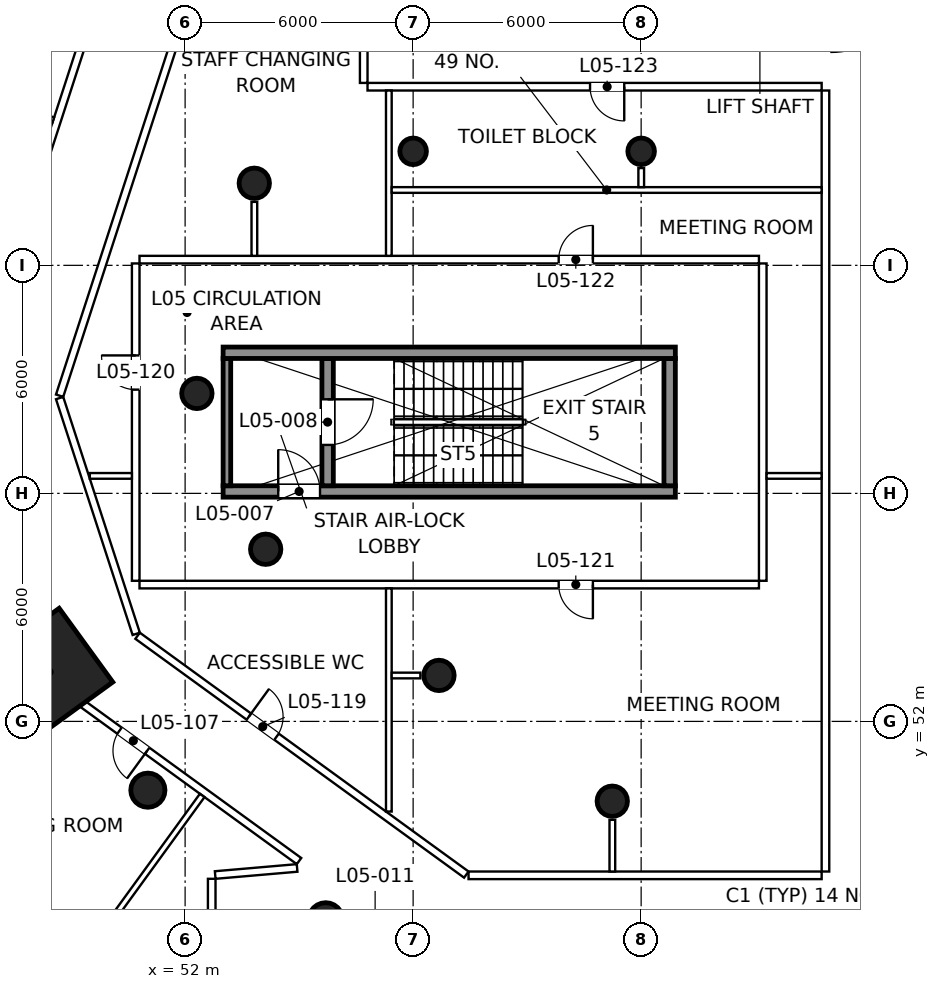
"""IFC4 building model, lengths in metres.
Left out: names, types, materials, properties, quantities, classifications, styles, units other than length and angle.
Written with IfcOpenShell. Run it as: python <this file> out.ifc"""

import sys

from ifc_helpers import new_model, si_unit, direction, frame, frame_2d, origin, origin_2d, place, context, subcontext, project, spatial, rectangle, circle, extrude, element, fill, save


model = new_model("IFC4")
c1 = context("Model", 3, precision=1e-05, world=origin(), true_north=direction((0.0, 1.0)))
c2 = subcontext(c1, "Body", "Model", "MODEL_VIEW")
j1 = project(units=[si_unit("LENGTHUNIT", "METRE"), si_unit("PLANEANGLEUNIT", "RADIAN")], contexts=[c1])
p1 = place(None, origin())
s1 = spatial("IfcSite", under=j1, at=p1, CompositionType="ELEMENT")
p2 = place(p1, origin())
s2 = spatial("IfcBuilding", under=s1, at=p2, CompositionType="ELEMENT")
p3 = place(p2, frame((0.0, 0.0, 34.0)))
s3 = spatial("IfcBuildingStorey", under=s2, at=p3, CompositionType="ELEMENT", Elevation=34.0)
p4 = place(p3, frame((48.42, 53.3, 0.0), z_axis=(0.0, 0.0, 1.0), x_axis=(-0.809016994375, -0.587785252292, 0.0)))
e1 = element("IfcColumn", 1, at=p4, inside=s3, PredefinedType="COLUMN", context=c2, shape_type="SweptSolid", body=[
    extrude(rectangle(XDim=2.4, YDim=2.4, at=origin_2d()), origin(), (0.0, 0.0, 1.0), 5.0),
])
for number, where, z_axis, x_axis in (
    (2, (51.02, 50.19, 0.0), (0.0, 0.0, 1.0), (1.0, 0.0, 0.0)),
    (3, (55.7, 46.78, 0.0), (0.0, 0.0, 1.0), (1.0, 0.0, 0.0)),
):
    element("IfcColumn", number, at=place(p3, frame(where, z_axis=z_axis, x_axis=x_axis)), inside=s3, PredefinedType="COLUMN", context=c2, shape_type="SweptSolid", body=[
        extrude(circle(Radius=0.45, at=origin_2d()), origin(), (0.0, 0.0, 1.0), 5.0),
    ])
for number, where, z_axis, x_axis in (
    (4, (52.31, 60.63, 0.0), (0.0, 0.0, 1.0), (1.0, 0.0, 0.0)),
    (5, (54.12, 56.53, 0.0), (0.0, 0.0, 1.0), (1.0, 0.0, 0.0)),
    (6, (58.68, 53.21, 0.0), (0.0, 0.0, 1.0), (1.0, 0.0, 0.0)),
    (7, (63.24, 49.9, 0.0), (0.0, 0.0, 1.0), (1.0, 0.0, 0.0)),
    (8, (53.82, 66.16, 0.0), (0.0, 0.0, 1.0), (1.0, 0.0, 0.0)),
):
    element("IfcColumn", number, at=place(p3, frame(where, z_axis=z_axis, x_axis=x_axis)), inside=s3, PredefinedType="COLUMN", context=c2, shape_type="SweptSolid", body=[
        extrude(circle(Radius=0.4, at=origin_2d()), origin(), (0.0, 0.0, 1.0), 5.0),
    ])
for number, where, z_axis, x_axis in (
    (9, (58.0, 67.0, 0.0), (0.0, 0.0, 1.0), (1.0, 0.0, 0.0)),
    (10, (64.0, 67.0, 0.0), (0.0, 0.0, 1.0), (1.0, 0.0, 0.0)),
):
    element("IfcColumn", number, at=place(p3, frame(where, z_axis=z_axis, x_axis=x_axis)), inside=s3, PredefinedType="COLUMN", context=c2, shape_type="SweptSolid", body=[
        extrude(circle(Radius=0.35, at=origin_2d()), origin(), (0.0, 0.0, 1.0), 5.0),
    ])
p5 = place(p3, frame((43.634, 48.126, 0.0), z_axis=(0.0, 0.0, 1.0), x_axis=(0.808999938455, -0.587808727036, 0.0)))
e11 = element("IfcWall", 11, at=p5, inside=s3, PredefinedType="SOLIDWALL", context=c2, shape_type="SweptSolid", body=[
    extrude(rectangle(XDim=9.0, YDim=0.32, at=frame_2d((4.5, 0.0))), origin(), (0.0, 0.0, 1.0), 0.9),
])
p6 = place(p3, frame((53.0, 58.05, 0.0), z_axis=(0.0, 0.0, 1.0), x_axis=(1.0, 0.0, 0.0)))
e12 = element("IfcWall", 12, at=p6, inside=s3, PredefinedType="SHEAR", context=c2, shape_type="SweptSolid", body=[
    extrude(rectangle(XDim=11.9, YDim=0.3, at=frame_2d((5.95, 0.0))), origin(), (0.0, 0.0, 1.0), 5.0),
])
p7 = place(p6, frame((1.45, 0.0, 0.0)))
e13 = element("IfcOpeningElement", 13, at=p7, cuts=e12, PredefinedType="OPENING", context=c2, shape_type="SweptSolid", body=[
    extrude(rectangle(XDim=1.1, YDim=2.1, at=frame_2d((0.55, 1.05))), frame((0.0, 0.16, 0.0), z_axis=(0.0, -1.0, 0.0), x_axis=(1.0, 0.0, 0.0)), (0.0, 0.0, 1.0), 0.32),
])
p8 = place(p3, frame((53.1, 58.2, 0.0), z_axis=(0.0, 0.0, 1.0), x_axis=(0.0, 1.0, 0.0)))
e14 = element("IfcWall", 14, at=p8, inside=s3, PredefinedType="SHEAR", context=c2, shape_type="SweptSolid", body=[
    extrude(rectangle(XDim=3.35, YDim=0.2, at=frame_2d((1.675, 0.0))), origin(), (0.0, 0.0, 1.0), 5.0),
])
p9 = place(p3, frame((55.75, 58.2, 0.0), z_axis=(0.0, 0.0, 1.0), x_axis=(0.0, 1.0, 0.0)))
e15 = element("IfcWall", 15, at=p9, inside=s3, PredefinedType="SHEAR", context=c2, shape_type="SweptSolid", body=[
    extrude(rectangle(XDim=3.35, YDim=0.3, at=frame_2d((1.675, 0.0))), origin(), (0.0, 0.0, 1.0), 5.0),
])
p10 = place(p9, frame((1.075, 0.0, 0.0)))
e16 = element("IfcOpeningElement", 16, at=p10, cuts=e15, PredefinedType="OPENING", context=c2, shape_type="SweptSolid", body=[
    extrude(rectangle(XDim=1.2, YDim=2.1, at=frame_2d((0.6, 1.05))), frame((0.0, 0.16, 0.0), z_axis=(0.0, -1.0, 0.0), x_axis=(1.0, 0.0, 0.0)), (0.0, 0.0, 1.0), 0.32),
])
p11 = place(p3, frame((64.75, 58.2, 0.0), z_axis=(0.0, 0.0, 1.0), x_axis=(0.0, 1.0, 0.0)))
e17 = element("IfcWall", 17, at=p11, inside=s3, PredefinedType="SHEAR", context=c2, shape_type="SweptSolid", body=[
    extrude(rectangle(XDim=3.35, YDim=0.3, at=frame_2d((1.675, 0.0))), origin(), (0.0, 0.0, 1.0), 5.0),
])
p12 = place(p3, frame((53.0, 61.7, 0.0), z_axis=(0.0, 0.0, 1.0), x_axis=(1.0, 0.0, 0.0)))
e18 = element("IfcWall", 18, at=p12, inside=s3, PredefinedType="SHEAR", context=c2, shape_type="SweptSolid", body=[
    extrude(rectangle(XDim=11.9, YDim=0.3, at=frame_2d((5.95, 0.0))), origin(), (0.0, 0.0, 1.0), 5.0),
])
p13 = place(p3, frame((52.7, 41.737, 0.0), z_axis=(0.0, 0.0, 1.0), x_axis=(0.0, 1.0, 0.0)))
e19 = element("IfcWall", 19, at=p13, inside=s3, PredefinedType="PARTITIONING", context=c2, shape_type="SweptSolid", body=[
    extrude(rectangle(XDim=6.122, YDim=0.2, at=frame_2d((3.061, 0.0))), origin(), (0.0, 0.0, 1.0), 3.9),
])
p14 = place(p13, frame((2.656, 0.0, 0.0)))
e20 = element("IfcOpeningElement", 20, at=p14, cuts=e19, PredefinedType="OPENING", context=c2, shape_type="SweptSolid", body=[
    extrude(rectangle(XDim=0.9, YDim=2.1, at=frame_2d((0.45, 1.05))), frame((0.0, 0.11, 0.0), z_axis=(0.0, -1.0, 0.0), x_axis=(1.0, 0.0, 0.0)), (0.0, 0.0, 1.0), 0.22),
])
p15 = place(p3, frame((52.792, 47.958, 0.0), z_axis=(0.0, 0.0, 1.0), x_axis=(0.996286600035, 0.086098841978, 0.0)))
e21 = element("IfcWall", 21, at=p15, inside=s3, PredefinedType="PARTITIONING", context=c2, shape_type="SweptSolid", body=[
    extrude(rectangle(XDim=2.164, YDim=0.2, at=frame_2d((1.082, 0.0))), origin(), (0.0, 0.0, 1.0), 4.1),
])
p16 = place(p3, frame((54.997, 48.325, 0.0), z_axis=(0.0, 0.0, 1.0), x_axis=(-0.809019601086, 0.587781664446, 0.0)))
e22 = element("IfcWall", 22, at=p16, inside=s3, PredefinedType="PARTITIONING", context=c2, shape_type="SweptSolid", body=[
    extrude(rectangle(XDim=7.668, YDim=0.2, at=frame_2d((3.834, 0.0))), origin(), (0.0, 0.0, 1.0), 4.1),
])
p17 = place(p16, frame((4.938, 0.0, 0.0)))
e23 = element("IfcOpeningElement", 23, at=p17, cuts=e22, PredefinedType="OPENING", context=c2, shape_type="SweptSolid", body=[
    extrude(rectangle(XDim=0.9, YDim=2.1, at=frame_2d((0.45, 1.05))), frame((0.0, 0.11, 0.0), z_axis=(0.0, -1.0, 0.0), x_axis=(1.0, 0.0, 0.0)), (0.0, 0.0, 1.0), 0.22),
])
p18 = place(p3, frame((48.757, 52.882, 0.0), z_axis=(0.0, 0.0, 1.0), x_axis=(-0.309030308026, 0.951052190325, 0.0)))
e24 = element("IfcWall", 24, at=p18, inside=s3, PredefinedType="PARTITIONING", context=c2, shape_type="SweptSolid", body=[
    extrude(rectangle(XDim=8.019, YDim=0.2, at=frame_2d((4.009, 0.0))), origin(), (0.0, 0.0, 1.0), 3.9),
])
p19 = place(p18, frame((6.33, 0.0, 0.0)))
e25 = element("IfcOpeningElement", 25, at=p19, cuts=e24, PredefinedType="OPENING", context=c2, shape_type="SweptSolid", body=[
    extrude(rectangle(XDim=0.9, YDim=2.1, at=frame_2d((0.45, 1.05))), frame((0.0, 0.11, 0.0), z_axis=(0.0, -1.0, 0.0), x_axis=(1.0, 0.0, 0.0)), (0.0, 0.0, 1.0), 0.22),
])
p20 = place(p18, frame((2.288, 0.0, 0.0)))
e26 = element("IfcOpeningElement", 26, at=p20, cuts=e24, PredefinedType="OPENING", context=c2, shape_type="SweptSolid", body=[
    extrude(rectangle(XDim=0.9, YDim=2.1, at=frame_2d((0.45, 1.05))), frame((0.0, 0.11, 0.0), z_axis=(0.0, -1.0, 0.0), x_axis=(1.0, 0.0, 0.0)), (0.0, 0.0, 1.0), 0.22),
])
p21 = place(p3, frame((46.279, 60.57, 0.0), z_axis=(0.0, 0.0, 1.0), x_axis=(0.309020575415, 0.951055352737, 0.0)))
e27 = element("IfcWall", 27, at=p21, inside=s3, PredefinedType="PARTITIONING", context=c2, shape_type="SweptSolid", body=[
    extrude(rectangle(XDim=21.409, YDim=0.2, at=frame_2d((10.704, 0.0))), origin(), (0.0, 0.0, 1.0), 3.9),
])
p22 = place(p21, frame((20.005, 0.0, 0.0)))
e28 = element("IfcOpeningElement", 28, at=p22, cuts=e27, PredefinedType="OPENING", context=c2, shape_type="SweptSolid", body=[
    extrude(rectangle(XDim=0.8, YDim=2.1, at=frame_2d((0.4, 1.05))), frame((0.0, 0.11, 0.0), z_axis=(0.0, -1.0, 0.0), x_axis=(1.0, 0.0, 0.0)), (0.0, 0.0, 1.0), 0.22),
])
p23 = place(p21, frame((16.142, 0.0, 0.0)))
e29 = element("IfcOpeningElement", 29, at=p23, cuts=e27, PredefinedType="OPENING", context=c2, shape_type="SweptSolid", body=[
    extrude(rectangle(XDim=0.9, YDim=2.1, at=frame_2d((0.45, 1.05))), frame((0.0, 0.11, 0.0), z_axis=(0.0, -1.0, 0.0), x_axis=(1.0, 0.0, 0.0)), (0.0, 0.0, 1.0), 0.22),
])
p24 = place(p21, frame((10.142, 0.0, 0.0)))
e30 = element("IfcOpeningElement", 30, at=p24, cuts=e27, PredefinedType="OPENING", context=c2, shape_type="SweptSolid", body=[
    extrude(rectangle(XDim=0.9, YDim=2.1, at=frame_2d((0.45, 1.05))), frame((0.0, 0.11, 0.0), z_axis=(0.0, -1.0, 0.0), x_axis=(1.0, 0.0, 0.0)), (0.0, 0.0, 1.0), 0.22),
])
p25 = place(p21, frame((3.33, 0.0, 0.0)))
e31 = element("IfcOpeningElement", 31, at=p25, cuts=e27, PredefinedType="OPENING", context=c2, shape_type="SweptSolid", body=[
    extrude(rectangle(XDim=0.9, YDim=2.1, at=frame_2d((0.45, 1.05))), frame((0.0, 0.11, 0.0), z_axis=(0.0, -1.0, 0.0), x_axis=(1.0, 0.0, 0.0)), (0.0, 0.0, 1.0), 0.22),
])
p26 = place(p3, frame((68.75, 68.7, 0.0), z_axis=(0.0, 0.0, 1.0), x_axis=(-1.0, 0.0, 0.0)))
e32 = element("IfcWall", 32, at=p26, inside=s3, PredefinedType="PARTITIONING", context=c2, shape_type="SweptSolid", body=[
    extrude(rectangle(XDim=11.95, YDim=0.2, at=frame_2d((5.975, 0.0))), origin(), (0.0, 0.0, 1.0), 4.6),
])
p27 = place(p26, frame((5.195, 0.0, 0.0)))
e33 = element("IfcOpeningElement", 33, at=p27, cuts=e32, PredefinedType="OPENING", context=c2, shape_type="SweptSolid", body=[
    extrude(rectangle(XDim=0.9, YDim=2.1, at=frame_2d((0.45, 1.05))), frame((0.0, 0.11, 0.0), z_axis=(0.0, -1.0, 0.0), x_axis=(1.0, 0.0, 0.0)), (0.0, 0.0, 1.0), 0.22),
])
p28 = place(p3, frame((56.7, 68.8, 0.0), z_axis=(0.0, 0.0, 1.0), x_axis=(0.0, 1.0, 0.0)))
e34 = element("IfcWall", 34, at=p28, inside=s3, PredefinedType="PARTITIONING", context=c2, shape_type="SweptSolid", body=[
    extrude(rectangle(XDim=9.8, YDim=0.2, at=frame_2d((4.9, 0.0))), origin(), (0.0, 0.0, 1.0), 4.0),
])
p29 = place(p3, frame((54.566, 78.631, 0.0), z_axis=(0.0, 0.0, 1.0), x_axis=(-0.309021827521, -0.951054945897, 0.0)))
e35 = element("IfcWall", 35, at=p29, inside=s3, PredefinedType="PARTITIONING", context=c2, shape_type="SweptSolid", body=[
    extrude(rectangle(XDim=18.99, YDim=0.2, at=frame_2d((9.495, 0.0))), origin(), (0.0, 0.0, 1.0), 4.6),
])
p30 = place(p3, frame((48.698, 60.508, 0.0), z_axis=(0.0, 0.0, 1.0), x_axis=(0.308999759659, -0.951062116021, 0.0)))
e36 = element("IfcWall", 36, at=p30, inside=s3, PredefinedType="PARTITIONING", context=c2, shape_type="SweptSolid", body=[
    extrude(rectangle(XDim=6.524, YDim=0.2, at=frame_2d((3.262, 0.0))), origin(), (0.0, 0.0, 1.0), 4.6),
])
p31 = place(p3, frame((50.75, 54.254, 0.0), z_axis=(0.0, 0.0, 1.0), x_axis=(0.809010498572, -0.587794192894, 0.0)))
e37 = element("IfcWall", 37, at=p31, inside=s3, PredefinedType="PARTITIONING", context=c2, shape_type="SweptSolid", body=[
    extrude(rectangle(XDim=10.692, YDim=0.2, at=frame_2d((5.346, 0.0))), origin(), (0.0, 0.0, 1.0), 4.6),
])
p32 = place(p31, frame((3.62, 0.0, 0.0)))
e38 = element("IfcOpeningElement", 38, at=p32, cuts=e37, PredefinedType="OPENING", context=c2, shape_type="SweptSolid", body=[
    extrude(rectangle(XDim=0.9, YDim=2.1, at=frame_2d((0.45, 1.05))), frame((0.0, 0.11, 0.0), z_axis=(0.0, -1.0, 0.0), x_axis=(1.0, 0.0, 0.0)), (0.0, 0.0, 1.0), 0.22),
])
p33 = place(p3, frame((59.458, 47.95, 0.0), z_axis=(0.0, 0.0, 1.0), x_axis=(1.0, 0.0, 0.0)))
e39 = element("IfcWall", 39, at=p33, inside=s3, PredefinedType="PARTITIONING", context=c2, shape_type="SweptSolid", body=[
    extrude(rectangle(XDim=9.292, YDim=0.2, at=frame_2d((4.646, 0.0))), origin(), (0.0, 0.0, 1.0), 4.0),
])
p34 = place(p3, frame((68.85, 48.05, 0.0), z_axis=(0.0, 0.0, 1.0), x_axis=(0.0, 1.0, 0.0)))
e40 = element("IfcWall", 40, at=p34, inside=s3, PredefinedType="PARTITIONING", context=c2, shape_type="SweptSolid", body=[
    extrude(rectangle(XDim=20.55, YDim=0.2, at=frame_2d((10.275, 0.0))), origin(), (0.0, 0.0, 1.0), 4.6),
])
p35 = place(p3, frame((67.2, 64.05, 0.0), z_axis=(0.0, 0.0, 1.0), x_axis=(0.0, -1.0, 0.0)))
e41 = element("IfcWall", 41, at=p35, inside=s3, PredefinedType="PARTITIONING", context=c2, shape_type="SweptSolid", body=[
    extrude(rectangle(XDim=8.35, YDim=0.2, at=frame_2d((4.175, 0.0))), origin(), (0.0, 0.0, 1.0), 4.6),
])
p36 = place(p3, frame((67.1, 55.6, 0.0), z_axis=(0.0, 0.0, 1.0), x_axis=(-1.0, 0.0, 0.0)))
e42 = element("IfcWall", 42, at=p36, inside=s3, PredefinedType="PARTITIONING", context=c2, shape_type="SweptSolid", body=[
    extrude(rectangle(XDim=16.3, YDim=0.2, at=frame_2d((8.15, 0.0))), origin(), (0.0, 0.0, 1.0), 4.0),
])
p37 = place(p36, frame((4.37, 0.0, 0.0)))
e43 = element("IfcOpeningElement", 43, at=p37, cuts=e42, PredefinedType="OPENING", context=c2, shape_type="SweptSolid", body=[
    extrude(rectangle(XDim=0.9, YDim=2.1, at=frame_2d((0.45, 1.05))), frame((0.0, 0.11, 0.0), z_axis=(0.0, -1.0, 0.0), x_axis=(1.0, 0.0, 0.0)), (0.0, 0.0, 1.0), 0.22),
])
p38 = place(p3, frame((50.7, 55.7, 0.0), z_axis=(0.0, 0.0, 1.0), x_axis=(0.0, 1.0, 0.0)))
e44 = element("IfcWall", 44, at=p38, inside=s3, PredefinedType="PARTITIONING", context=c2, shape_type="SweptSolid", body=[
    extrude(rectangle(XDim=8.35, YDim=0.2, at=frame_2d((4.175, 0.0))), origin(), (0.0, 0.0, 1.0), 4.6),
])
p39 = place(p38, frame((5.03, 0.0, 0.0)))
e45 = element("IfcOpeningElement", 45, at=p39, cuts=e44, PredefinedType="OPENING", context=c2, shape_type="SweptSolid", body=[
    extrude(rectangle(XDim=0.9, YDim=2.1, at=frame_2d((0.45, 1.05))), frame((0.0, 0.11, 0.0), z_axis=(0.0, -1.0, 0.0), x_axis=(1.0, 0.0, 0.0)), (0.0, 0.0, 1.0), 0.22),
])
p40 = place(p3, frame((50.8, 64.15, 0.0), z_axis=(0.0, 0.0, 1.0), x_axis=(1.0, 0.0, 0.0)))
e46 = element("IfcWall", 46, at=p40, inside=s3, PredefinedType="PARTITIONING", context=c2, shape_type="SweptSolid", body=[
    extrude(rectangle(XDim=16.3, YDim=0.2, at=frame_2d((8.15, 0.0))), origin(), (0.0, 0.0, 1.0), 4.0),
])
p41 = place(p40, frame((11.031, 0.0, 0.0)))
e47 = element("IfcOpeningElement", 47, at=p41, cuts=e46, PredefinedType="OPENING", context=c2, shape_type="SweptSolid", body=[
    extrude(rectangle(XDim=0.9, YDim=2.1, at=frame_2d((0.45, 1.05))), frame((0.0, 0.11, 0.0), z_axis=(0.0, -1.0, 0.0), x_axis=(1.0, 0.0, 0.0)), (0.0, 0.0, 1.0), 0.22),
])
p42 = place(p3, frame((43.085, 48.723, 0.0), z_axis=(0.0, 0.0, 1.0), x_axis=(0.809006827345, 0.587799245754, 0.0)))
e48 = element("IfcWall", 48, at=p42, inside=s3, PredefinedType="PARTITIONING", context=c2, shape_type="SweptSolid", body=[
    extrude(rectangle(XDim=6.939, YDim=0.15, at=frame_2d((3.469, 0.0))), origin(), (0.0, 0.0, 1.0), 4.6),
])
p43 = place(p3, frame((42.272, 69.855, 0.0), z_axis=(0.0, 0.0, 1.0), x_axis=(0.951049337045, -0.309039088961, 0.0)))
e49 = element("IfcWall", 49, at=p43, inside=s3, PredefinedType="PARTITIONING", context=c2, shape_type="SweptSolid", body=[
    extrude(rectangle(XDim=6.58, YDim=0.15, at=frame_2d((3.29, 0.0))), origin(), (0.0, 0.0, 1.0), 4.1),
])
p44 = place(p3, frame((48.582, 44.729, 0.0), z_axis=(0.0, 0.0, 1.0), x_axis=(0.587778942742, 0.809021578494, 0.0)))
e50 = element("IfcWall", 50, at=p44, inside=s3, PredefinedType="PARTITIONING", context=c2, shape_type="SweptSolid", body=[
    extrude(rectangle(XDim=6.58, YDim=0.15, at=frame_2d((3.29, 0.0))), origin(), (0.0, 0.0, 1.0), 3.9),
])
p45 = place(p3, frame((57.361, 49.628, 0.0), z_axis=(0.0, 0.0, 1.0), x_axis=(0.0, 1.0, 0.0)))
e51 = element("IfcWall", 51, at=p45, inside=s3, PredefinedType="PARTITIONING", context=c2, shape_type="SweptSolid", body=[
    extrude(rectangle(XDim=5.872, YDim=0.15, at=frame_2d((2.936, 0.0))), origin(), (0.0, 0.0, 1.0), 4.0),
])
p46 = place(p3, frame((57.361, 64.25, 0.0), z_axis=(0.0, 0.0, 1.0), x_axis=(0.0, 1.0, 0.0)))
e52 = element("IfcWall", 52, at=p46, inside=s3, PredefinedType="PARTITIONING", context=c2, shape_type="SweptSolid", body=[
    extrude(rectangle(XDim=4.35, YDim=0.15, at=frame_2d((2.175, 0.0))), origin(), (0.0, 0.0, 1.0), 4.6),
])
p47 = place(p3, frame((49.492, 58.46, 0.0), z_axis=(0.0, 0.0, 1.0), x_axis=(1.0, 0.0, 0.0)))
e53 = element("IfcWall", 53, at=p47, inside=s3, PredefinedType="PARTITIONING", context=c2, shape_type="SweptSolid", body=[
    extrude(rectangle(XDim=1.108, YDim=0.15, at=frame_2d((0.554, 0.0))), origin(), (0.0, 0.0, 1.0), 4.6),
])
p48 = place(p3, frame((67.3, 58.46, 0.0), z_axis=(0.0, 0.0, 1.0), x_axis=(1.0, 0.0, 0.0)))
e54 = element("IfcWall", 54, at=p48, inside=s3, PredefinedType="PARTITIONING", context=c2, shape_type="SweptSolid", body=[
    extrude(rectangle(XDim=1.45, YDim=0.15, at=frame_2d((0.725, 0.0))), origin(), (0.0, 0.0, 1.0), 4.6),
])
p49 = place(p3, frame((57.436, 65.983, 0.0), z_axis=(0.0, 0.0, 1.0), x_axis=(1.0, 0.0, 0.0)))
e55 = element("IfcWall", 55, at=p49, inside=s3, PredefinedType="PARTITIONING", context=c2, shape_type="SweptSolid", body=[
    extrude(rectangle(XDim=11.314, YDim=0.15, at=frame_2d((5.657, 0.0))), origin(), (0.0, 0.0, 1.0), 4.6),
])
p50 = place(p3, frame((58.19, 53.208, 0.0), z_axis=(0.0, 0.0, 1.0), x_axis=(-1.0, 0.0, 0.0)))
e56 = element("IfcWall", 56, at=p50, inside=s3, PredefinedType="PARTITIONING", context=c2, shape_type="SweptSolid", body=[
    extrude(rectangle(XDim=0.754, YDim=0.15, at=frame_2d((0.377, 0.0))), origin(), (0.0, 0.0, 1.0), 4.6),
])
p51 = place(p3, frame((63.242, 49.41, 0.0), z_axis=(0.0, 0.0, 1.0), x_axis=(0.0, -1.0, 0.0)))
e57 = element("IfcWall", 57, at=p51, inside=s3, PredefinedType="PARTITIONING", context=c2, shape_type="SweptSolid", body=[
    extrude(rectangle(XDim=1.36, YDim=0.15, at=frame_2d((0.68, 0.0))), origin(), (0.0, 0.0, 1.0), 4.6),
])
p52 = place(p3, frame((53.822, 65.67, 0.0), z_axis=(0.0, 0.0, 1.0), x_axis=(0.0, -1.0, 0.0)))
e58 = element("IfcWall", 58, at=p52, inside=s3, PredefinedType="PARTITIONING", context=c2, shape_type="SweptSolid", body=[
    extrude(rectangle(XDim=1.42, YDim=0.15, at=frame_2d((0.71, 0.0))), origin(), (0.0, 0.0, 1.0), 4.0),
])
p53 = place(p3, frame((64.002, 66.56, 0.0), z_axis=(0.0, 0.0, 1.0), x_axis=(0.0, -1.0, 0.0)))
e59 = element("IfcWall", 59, at=p53, inside=s3, PredefinedType="PARTITIONING", context=c2, shape_type="SweptSolid", body=[
    extrude(rectangle(XDim=0.502, YDim=0.15, at=frame_2d((0.251, 0.0))), origin(), (0.0, 0.0, 1.0), 4.6),
])
p54 = place(p7, origin())
e60 = element("IfcDoor", 60, at=p54, inside=s3, OperationType="SINGLE_SWING_LEFT", PredefinedType="DOOR", context=c2, shape_type="SweptSolid", body=[
    extrude(rectangle(XDim=1.1, YDim=2.1, at=frame_2d((0.55, 1.05))), frame((0.0, 0.025, 0.0), z_axis=(0.0, -1.0, 0.0), x_axis=(1.0, 0.0, 0.0)), (0.0, 0.0, 1.0), 0.05),
])
fill(e13, e60)
p55 = place(p10, frame((1.2, 0.0, 0.0), z_axis=(0.0, 0.0, 1.0), x_axis=(-1.0, 0.0, 0.0)))
e61 = element("IfcDoor", 61, at=p55, inside=s3, OperationType="SINGLE_SWING_LEFT", PredefinedType="DOOR", context=c2, shape_type="SweptSolid", body=[
    extrude(rectangle(XDim=1.2, YDim=2.1, at=frame_2d((0.6, 1.05))), frame((0.0, 0.025, 0.0), z_axis=(0.0, -1.0, 0.0), x_axis=(1.0, 0.0, 0.0)), (0.0, 0.0, 1.0), 0.05),
])
fill(e16, e61)
p56 = place(p17, origin())
e62 = element("IfcDoor", 62, at=p56, inside=s3, OperationType="SINGLE_SWING_LEFT", PredefinedType="DOOR", context=c2, shape_type="SweptSolid", body=[
    extrude(rectangle(XDim=0.9, YDim=2.1, at=frame_2d((0.45, 1.05))), frame((0.0, 0.025, 0.0), z_axis=(0.0, -1.0, 0.0), x_axis=(1.0, 0.0, 0.0)), (0.0, 0.0, 1.0), 0.05),
])
fill(e23, e62)
p57 = place(p32, origin())
e63 = element("IfcDoor", 63, at=p57, inside=s3, OperationType="SINGLE_SWING_LEFT", PredefinedType="DOOR", context=c2, shape_type="SweptSolid", body=[
    extrude(rectangle(XDim=0.9, YDim=2.1, at=frame_2d((0.45, 1.05))), frame((0.0, 0.025, 0.0), z_axis=(0.0, -1.0, 0.0), x_axis=(1.0, 0.0, 0.0)), (0.0, 0.0, 1.0), 0.05),
])
fill(e38, e63)
p58 = place(p39, origin())
e64 = element("IfcDoor", 64, at=p58, inside=s3, OperationType="SINGLE_SWING_RIGHT", PredefinedType="DOOR", context=c2, shape_type="SweptSolid", body=[
    extrude(rectangle(XDim=0.9, YDim=2.1, at=frame_2d((0.45, 1.05))), frame((0.0, 0.025, 0.0), z_axis=(0.0, -1.0, 0.0), x_axis=(1.0, 0.0, 0.0)), (0.0, 0.0, 1.0), 0.05),
])
fill(e45, e64)
p59 = place(p37, origin())
e65 = element("IfcDoor", 65, at=p59, inside=s3, OperationType="SINGLE_SWING_LEFT", PredefinedType="DOOR", context=c2, shape_type="SweptSolid", body=[
    extrude(rectangle(XDim=0.9, YDim=2.1, at=frame_2d((0.45, 1.05))), frame((0.0, 0.025, 0.0), z_axis=(0.0, -1.0, 0.0), x_axis=(1.0, 0.0, 0.0)), (0.0, 0.0, 1.0), 0.05),
])
fill(e43, e65)
p60 = place(p41, origin())
e66 = element("IfcDoor", 66, at=p60, inside=s3, OperationType="SINGLE_SWING_RIGHT", PredefinedType="DOOR", context=c2, shape_type="SweptSolid", body=[
    extrude(rectangle(XDim=0.9, YDim=2.1, at=frame_2d((0.45, 1.05))), frame((0.0, 0.025, 0.0), z_axis=(0.0, -1.0, 0.0), x_axis=(1.0, 0.0, 0.0)), (0.0, 0.0, 1.0), 0.05),
])
fill(e47, e66)
p61 = place(p27, origin())
e67 = element("IfcDoor", 67, at=p61, inside=s3, OperationType="SINGLE_SWING_LEFT", PredefinedType="DOOR", context=c2, shape_type="SweptSolid", body=[
    extrude(rectangle(XDim=0.9, YDim=2.1, at=frame_2d((0.45, 1.05))), frame((0.0, 0.025, 0.0), z_axis=(0.0, -1.0, 0.0), x_axis=(1.0, 0.0, 0.0)), (0.0, 0.0, 1.0), 0.05),
])
fill(e33, e67)
save(model, sys.argv[1])
